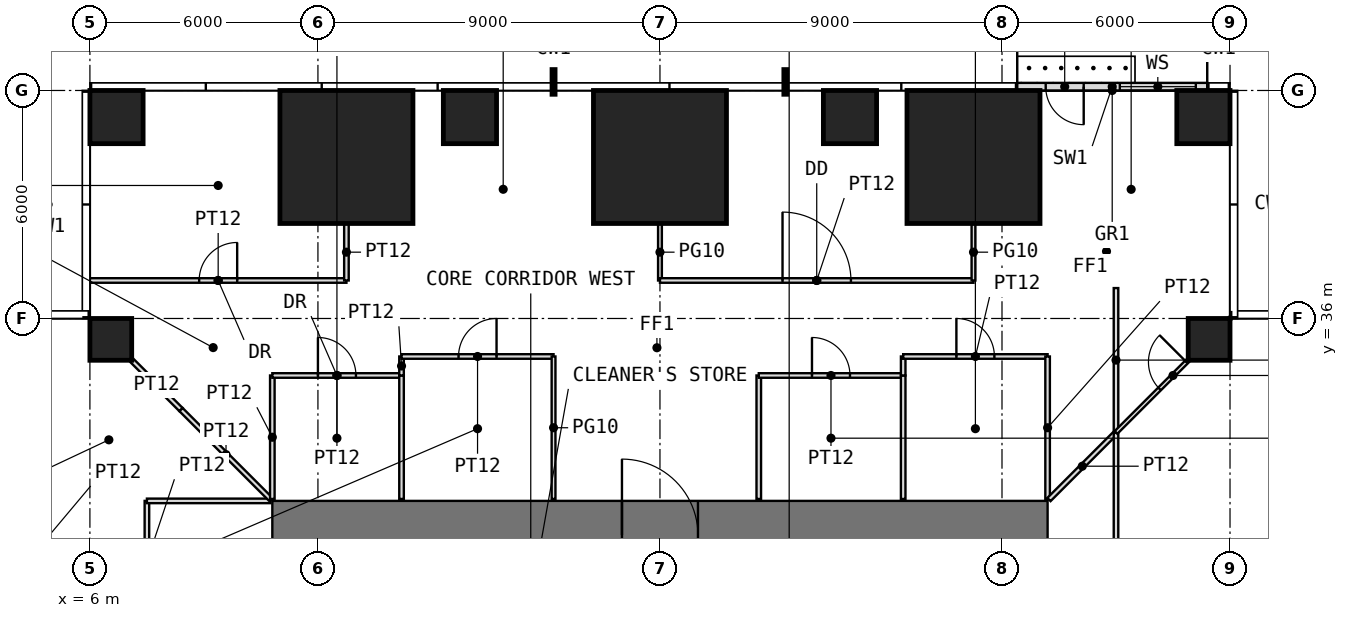
"""IFC4 building model, lengths in metres.
Left out: names, types, materials, properties, quantities, classifications, styles, units other than length and angle.
Written with IfcOpenShell. Run it as: python <this file> out.ifc"""

import sys

from ifc_helpers import new_model, si_unit, direction, frame, frame_2d, origin, origin_2d, place, context, subcontext, project, spatial, rectangle, extrude, element, fill, save


model = new_model("IFC4")
c1 = context("Model", 3, precision=1e-05, world=origin(), true_north=direction((0.0, 1.0)))
c2 = subcontext(c1, "Body", "Model", "MODEL_VIEW")
j1 = project(units=[si_unit("LENGTHUNIT", "METRE"), si_unit("PLANEANGLEUNIT", "RADIAN")], contexts=[c1])
p1 = place(None, origin())
s1 = spatial("IfcSite", under=j1, at=p1, CompositionType="ELEMENT")
p2 = place(p1, origin())
s2 = spatial("IfcBuilding", under=s1, at=p2, CompositionType="ELEMENT")
p3 = place(p2, frame((0.0, 0.0, 38.5)))
s3 = spatial("IfcBuildingStorey", under=s2, at=p3, CompositionType="ELEMENT", Elevation=38.5)
for number, where, z_axis, x_axis in (
    (1, (6.55, 35.45, 0.0), (0.0, 0.0, 1.0), (1.0, 0.0, 0.0)),
    (2, (35.45, 35.45, 0.0), (0.0, 0.0, 1.0), (1.0, 0.0, 0.0)),
):
    element("IfcColumn", number, at=place(p3, frame(where, z_axis=z_axis, x_axis=x_axis)), inside=s3, PredefinedType="COLUMN", context=c2, shape_type="SweptSolid", body=[
        extrude(rectangle(XDim=1.1, YDim=1.1, at=origin_2d()), origin(), (0.0, 0.0, 1.0), 4.0),
    ])
p4 = place(p3, frame((6.7, 41.3, 0.0), z_axis=(0.0, 0.0, 1.0), x_axis=(1.0, 0.0, 0.0)))
e3 = element("IfcColumn", 3, at=p4, inside=s3, PredefinedType="COLUMN", context=c2, shape_type="SweptSolid", body=[
    extrude(rectangle(XDim=1.4, YDim=1.4, at=origin_2d()), origin(), (0.0, 0.0, 1.0), 4.0),
])
p5 = place(p3, frame((12.75, 40.25, 0.0), z_axis=(0.0, 0.0, 1.0), x_axis=(1.0, 0.0, 0.0)))
e4 = element("IfcColumn", 4, at=p5, inside=s3, PredefinedType="COLUMN", context=c2, shape_type="SweptSolid", body=[
    extrude(rectangle(XDim=3.5, YDim=3.5, at=origin_2d()), origin(), (0.0, 0.0, 1.0), 4.0),
])
p6 = place(p3, frame((16.0, 41.3, 0.0), z_axis=(0.0, 0.0, 1.0), x_axis=(1.0, 0.0, 0.0)))
e5 = element("IfcColumn", 5, at=p6, inside=s3, PredefinedType="COLUMN", context=c2, shape_type="SweptSolid", body=[
    extrude(rectangle(XDim=1.4, YDim=1.4, at=origin_2d()), origin(), (0.0, 0.0, 1.0), 4.0),
])
p7 = place(p3, frame((21.0, 40.25, 0.0), z_axis=(0.0, 0.0, 1.0), x_axis=(1.0, 0.0, 0.0)))
e6 = element("IfcColumn", 6, at=p7, inside=s3, PredefinedType="COLUMN", context=c2, shape_type="SweptSolid", body=[
    extrude(rectangle(XDim=3.5, YDim=3.5, at=origin_2d()), origin(), (0.0, 0.0, 1.0), 4.0),
])
p8 = place(p3, frame((26.0, 41.3, 0.0), z_axis=(0.0, 0.0, 1.0), x_axis=(1.0, 0.0, 0.0)))
e7 = element("IfcColumn", 7, at=p8, inside=s3, PredefinedType="COLUMN", context=c2, shape_type="SweptSolid", body=[
    extrude(rectangle(XDim=1.4, YDim=1.4, at=origin_2d()), origin(), (0.0, 0.0, 1.0), 4.0),
])
p9 = place(p3, frame((29.25, 40.25, 0.0), z_axis=(0.0, 0.0, 1.0), x_axis=(1.0, 0.0, 0.0)))
e8 = element("IfcColumn", 8, at=p9, inside=s3, PredefinedType="COLUMN", context=c2, shape_type="SweptSolid", body=[
    extrude(rectangle(XDim=3.5, YDim=3.5, at=origin_2d()), origin(), (0.0, 0.0, 1.0), 4.0),
])
p10 = place(p3, frame((35.3, 41.3, 0.0), z_axis=(0.0, 0.0, 1.0), x_axis=(1.0, 0.0, 0.0)))
e9 = element("IfcColumn", 9, at=p10, inside=s3, PredefinedType="COLUMN", context=c2, shape_type="SweptSolid", body=[
    extrude(rectangle(XDim=1.4, YDim=1.4, at=origin_2d()), origin(), (0.0, 0.0, 1.0), 4.0),
])
p11 = place(p3, frame((35.4, 42.1, 0.0), z_axis=(0.0, 0.0, 1.0), x_axis=(-1.0, 0.0, 0.0)))
e10 = element("IfcWall", 10, at=p11, inside=s3, PredefinedType="USERDEFINED", context=c2, shape_type="SweptSolid", body=[
    extrude(rectangle(XDim=5.0, YDim=0.2, at=frame_2d((2.5, 0.0))), origin(), (0.0, 0.0, 1.0), 3.75),
])
p12 = place(p11, frame((3.25, 0.0, 0.0)))
e11 = element("IfcOpeningElement", 11, at=p12, cuts=e10, PredefinedType="OPENING", context=c2, shape_type="SweptSolid", body=[
    extrude(rectangle(XDim=1.0, YDim=2.4, at=frame_2d((0.5, 1.2))), frame((0.0, 0.11, 0.0), z_axis=(0.0, -1.0, 0.0), x_axis=(1.0, 0.0, 0.0)), (0.0, 0.0, 1.0), 0.22),
])
p13 = place(p11, frame((0.3, 0.0, 0.3)))
e12 = element("IfcOpeningElement", 12, at=p13, cuts=e10, PredefinedType="OPENING", context=c2, shape_type="SweptSolid", body=[
    extrude(rectangle(XDim=2.0, YDim=2.7, at=frame_2d((1.0, 1.35))), frame((0.0, 0.11, 0.0), z_axis=(0.0, -1.0, 0.0), x_axis=(1.0, 0.0, 0.0)), (0.0, 0.0, 1.0), 0.22),
])
p14 = place(p3, frame((10.8, 30.3, -0.05), z_axis=(0.0, 0.0, 1.0), x_axis=(1.0, 0.0, 0.0)))
e13 = element("IfcWall", 13, at=p14, inside=s3, PredefinedType="SHEAR", context=c2, shape_type="SweptSolid", body=[
    extrude(rectangle(XDim=20.4, YDim=1.8, at=frame_2d((10.2, 0.0))), origin(), (0.0, 0.0, 1.0), 4.0),
])
p15 = place(p14, frame((9.2, 0.0, 0.05)))
e14 = element("IfcOpeningElement", 14, at=p15, cuts=e13, PredefinedType="OPENING", context=c2, shape_type="SweptSolid", body=[
    extrude(rectangle(XDim=2.0, YDim=2.2, at=frame_2d((1.0, 1.1))), frame((0.0, 0.91, 0.0), z_axis=(0.0, -1.0, 0.0), x_axis=(1.0, 0.0, 0.0)), (0.0, 0.0, 1.0), 1.82),
])
p16 = place(p3, frame((6.0, 37.0, 0.0), z_axis=(0.0, 0.0, 1.0), x_axis=(1.0, 0.0, 0.0)))
e15 = element("IfcWall", 15, at=p16, inside=s3, PredefinedType="PARTITIONING", context=c2, shape_type="SweptSolid", body=[
    extrude(rectangle(XDim=6.75, YDim=0.12, at=frame_2d((3.375, 0.0))), origin(), (0.0, 0.0, 1.0), 3.75),
])
p17 = place(p16, frame((2.875, 0.0, 0.0)))
e16 = element("IfcOpeningElement", 16, at=p17, cuts=e15, PredefinedType="OPENING", context=c2, shape_type="SweptSolid", body=[
    extrude(rectangle(XDim=1.0, YDim=2.2, at=frame_2d((0.5, 1.1))), frame((0.0, 0.07, 0.0), z_axis=(0.0, -1.0, 0.0), x_axis=(1.0, 0.0, 0.0)), (0.0, 0.0, 1.0), 0.14),
])
p18 = place(p3, frame((7.11, 34.89, 0.0), z_axis=(0.0, 0.0, 1.0), x_axis=(0.707106781187, -0.707106781187, 0.0)))
e17 = element("IfcWall", 17, at=p18, inside=s3, PredefinedType="PARTITIONING", context=c2, shape_type="SweptSolid", body=[
    extrude(rectangle(XDim=1.822, YDim=0.12, at=frame_2d((0.911, 0.0))), origin(), (0.0, 0.0, 1.0), 3.75),
])
p19 = place(p3, frame((7.5, 28.0, 0.0), z_axis=(0.0, 0.0, 1.0), x_axis=(0.0, 1.0, 0.0)))
e18 = element("IfcWall", 18, at=p19, inside=s3, PredefinedType="PARTITIONING", context=c2, shape_type="SweptSolid", body=[
    extrude(rectangle(XDim=3.2, YDim=0.12, at=frame_2d((1.6, 0.0))), origin(), (0.0, 0.0, 1.0), 3.75),
])
p20 = place(p19, frame((1.1, 0.0, 0.0)))
e19 = element("IfcOpeningElement", 19, at=p20, cuts=e18, PredefinedType="OPENING", context=c2, shape_type="SweptSolid", body=[
    extrude(rectangle(XDim=1.0, YDim=2.2, at=frame_2d((0.5, 1.1))), frame((0.0, 0.07, 0.0), z_axis=(0.0, -1.0, 0.0), x_axis=(1.0, 0.0, 0.0)), (0.0, 0.0, 1.0), 0.14),
])
p21 = place(p3, frame((7.5, 31.2, 0.0), z_axis=(0.0, 0.0, 1.0), x_axis=(1.0, 0.0, 0.0)))
e20 = element("IfcWall", 20, at=p21, inside=s3, PredefinedType="PARTITIONING", context=c2, shape_type="SweptSolid", body=[
    extrude(rectangle(XDim=3.25, YDim=0.12, at=frame_2d((1.625, 0.0))), origin(), (0.0, 0.0, 1.0), 3.75),
])
p22 = place(p3, frame((8.398, 33.602, 0.0), z_axis=(0.0, 0.0, 1.0), x_axis=(0.707106781187, -0.707106781187, 0.0)))
e21 = element("IfcWall", 21, at=p22, inside=s3, PredefinedType="PARTITIONING", context=c2, shape_type="SweptSolid", body=[
    extrude(rectangle(XDim=3.346, YDim=0.12, at=frame_2d((1.673, 0.0))), origin(), (0.0, 0.0, 1.0), 3.75),
])
p23 = place(p3, frame((10.8, 31.25, 0.0), z_axis=(0.0, 0.0, 1.0), x_axis=(0.0, 1.0, 0.0)))
e22 = element("IfcWall", 22, at=p23, inside=s3, PredefinedType="PARTITIONING", context=c2, shape_type="SweptSolid", body=[
    extrude(rectangle(XDim=3.25, YDim=0.12, at=frame_2d((1.625, 0.0))), origin(), (0.0, 0.0, 1.0), 3.75),
])
p24 = place(p3, frame((10.8, 34.5, 0.0), z_axis=(0.0, 0.0, 1.0), x_axis=(1.0, 0.0, 0.0)))
e23 = element("IfcWall", 23, at=p24, inside=s3, PredefinedType="PARTITIONING", context=c2, shape_type="SweptSolid", body=[
    extrude(rectangle(XDim=3.4, YDim=0.12, at=frame_2d((1.7, 0.0))), origin(), (0.0, 0.0, 1.0), 3.75),
])
p25 = place(p24, frame((1.2, 0.0, 0.0)))
e24 = element("IfcOpeningElement", 24, at=p25, cuts=e23, PredefinedType="OPENING", context=c2, shape_type="SweptSolid", body=[
    extrude(rectangle(XDim=1.0, YDim=2.2, at=frame_2d((0.5, 1.1))), frame((0.0, 0.07, 0.0), z_axis=(0.0, -1.0, 0.0), x_axis=(1.0, 0.0, 0.0)), (0.0, 0.0, 1.0), 0.14),
])
p26 = place(p3, frame((12.75, 37.0, 0.0), z_axis=(0.0, 0.0, 1.0), x_axis=(0.0, 1.0, 0.0)))
e25 = element("IfcWall", 25, at=p26, inside=s3, PredefinedType="PARTITIONING", context=c2, shape_type="SweptSolid", body=[
    extrude(rectangle(XDim=1.49, YDim=0.12, at=frame_2d((0.745, 0.0))), origin(), (0.0, 0.0, 1.0), 3.75),
])
p27 = place(p3, frame((14.2, 31.25, 0.0), z_axis=(0.0, 0.0, 1.0), x_axis=(0.0, 1.0, 0.0)))
e26 = element("IfcWall", 26, at=p27, inside=s3, PredefinedType="PARTITIONING", context=c2, shape_type="SweptSolid", body=[
    extrude(rectangle(XDim=3.25, YDim=0.12, at=frame_2d((1.625, 0.0))), origin(), (0.0, 0.0, 1.0), 3.75),
])
p28 = place(p3, frame((14.2, 34.5, 0.0), z_axis=(0.0, 0.0, 1.0), x_axis=(0.0, 1.0, 0.0)))
e27 = element("IfcWall", 27, at=p28, inside=s3, PredefinedType="PARTITIONING", context=c2, shape_type="SweptSolid", body=[
    extrude(rectangle(XDim=0.5, YDim=0.12, at=frame_2d((0.25, 0.0))), origin(), (0.0, 0.0, 1.0), 3.75),
])
p29 = place(p3, frame((14.2, 35.0, 0.0), z_axis=(0.0, 0.0, 1.0), x_axis=(1.0, 0.0, 0.0)))
e28 = element("IfcWall", 28, at=p29, inside=s3, PredefinedType="PARTITIONING", context=c2, shape_type="SweptSolid", body=[
    extrude(rectangle(XDim=4.0, YDim=0.12, at=frame_2d((2.0, 0.0))), origin(), (0.0, 0.0, 1.0), 3.75),
])
p30 = place(p29, frame((1.5, 0.0, 0.0)))
e29 = element("IfcOpeningElement", 29, at=p30, cuts=e28, PredefinedType="OPENING", context=c2, shape_type="SweptSolid", body=[
    extrude(rectangle(XDim=1.0, YDim=2.4, at=frame_2d((0.5, 1.2))), frame((0.0, 0.07, 0.0), z_axis=(0.0, -1.0, 0.0), x_axis=(1.0, 0.0, 0.0)), (0.0, 0.0, 1.0), 0.14),
])
p31 = place(p3, frame((18.2, 31.25, 0.0), z_axis=(0.0, 0.0, 1.0), x_axis=(0.0, 1.0, 0.0)))
e30 = element("IfcWall", 30, at=p31, inside=s3, PredefinedType="PARTITIONING", context=c2, shape_type="SweptSolid", body=[
    extrude(rectangle(XDim=3.75, YDim=0.1, at=frame_2d((1.875, 0.0))), origin(), (0.0, 0.0, 1.0), 3.75),
])
p32 = place(p3, frame((21.0, 37.0, 0.0), z_axis=(0.0, 0.0, 1.0), x_axis=(0.0, 1.0, 0.0)))
e31 = element("IfcWall", 31, at=p32, inside=s3, PredefinedType="PARTITIONING", context=c2, shape_type="SweptSolid", body=[
    extrude(rectangle(XDim=1.49, YDim=0.1, at=frame_2d((0.745, 0.0))), origin(), (0.0, 0.0, 1.0), 3.75),
])
p33 = place(p3, frame((21.0, 37.0, 0.0), z_axis=(0.0, 0.0, 1.0), x_axis=(1.0, 0.0, 0.0)))
e32 = element("IfcWall", 32, at=p33, inside=s3, PredefinedType="PARTITIONING", context=c2, shape_type="SweptSolid", body=[
    extrude(rectangle(XDim=8.25, YDim=0.12, at=frame_2d((4.125, 0.0))), origin(), (0.0, 0.0, 1.0), 3.75),
])
p34 = place(p33, frame((3.225, 0.0, 0.0)))
e33 = element("IfcOpeningElement", 33, at=p34, cuts=e32, PredefinedType="OPENING", context=c2, shape_type="SweptSolid", body=[
    extrude(rectangle(XDim=1.8, YDim=2.4, at=frame_2d((0.9, 1.2))), frame((0.0, 0.07, 0.0), z_axis=(0.0, -1.0, 0.0), x_axis=(1.0, 0.0, 0.0)), (0.0, 0.0, 1.0), 0.14),
])
p35 = place(p3, frame((23.6, 31.25, 0.0), z_axis=(0.0, 0.0, 1.0), x_axis=(0.0, 1.0, 0.0)))
e34 = element("IfcWall", 34, at=p35, inside=s3, PredefinedType="PARTITIONING", context=c2, shape_type="SweptSolid", body=[
    extrude(rectangle(XDim=3.25, YDim=0.12, at=frame_2d((1.625, 0.0))), origin(), (0.0, 0.0, 1.0), 3.75),
])
p36 = place(p3, frame((23.6, 34.5, 0.0), z_axis=(0.0, 0.0, 1.0), x_axis=(1.0, 0.0, 0.0)))
e35 = element("IfcWall", 35, at=p36, inside=s3, PredefinedType="PARTITIONING", context=c2, shape_type="SweptSolid", body=[
    extrude(rectangle(XDim=3.8, YDim=0.12, at=frame_2d((1.9, 0.0))), origin(), (0.0, 0.0, 1.0), 3.75),
])
p37 = place(p36, frame((1.4, 0.0, 0.0)))
e36 = element("IfcOpeningElement", 36, at=p37, cuts=e35, PredefinedType="OPENING", context=c2, shape_type="SweptSolid", body=[
    extrude(rectangle(XDim=1.0, YDim=2.2, at=frame_2d((0.5, 1.1))), frame((0.0, 0.07, 0.0), z_axis=(0.0, -1.0, 0.0), x_axis=(1.0, 0.0, 0.0)), (0.0, 0.0, 1.0), 0.14),
])
p38 = place(p3, frame((27.4, 31.25, 0.0), z_axis=(0.0, 0.0, 1.0), x_axis=(0.0, 1.0, 0.0)))
e37 = element("IfcWall", 37, at=p38, inside=s3, PredefinedType="PARTITIONING", context=c2, shape_type="SweptSolid", body=[
    extrude(rectangle(XDim=3.25, YDim=0.12, at=frame_2d((1.625, 0.0))), origin(), (0.0, 0.0, 1.0), 3.75),
])
p39 = place(p3, frame((27.4, 34.5, 0.0), z_axis=(0.0, 0.0, 1.0), x_axis=(0.0, 1.0, 0.0)))
e38 = element("IfcWall", 38, at=p39, inside=s3, PredefinedType="PARTITIONING", context=c2, shape_type="SweptSolid", body=[
    extrude(rectangle(XDim=0.5, YDim=0.12, at=frame_2d((0.25, 0.0))), origin(), (0.0, 0.0, 1.0), 3.75),
])
p40 = place(p3, frame((27.4, 35.0, 0.0), z_axis=(0.0, 0.0, 1.0), x_axis=(1.0, 0.0, 0.0)))
e39 = element("IfcWall", 39, at=p40, inside=s3, PredefinedType="PARTITIONING", context=c2, shape_type="SweptSolid", body=[
    extrude(rectangle(XDim=3.8, YDim=0.12, at=frame_2d((1.9, 0.0))), origin(), (0.0, 0.0, 1.0), 3.75),
])
p41 = place(p40, frame((1.4, 0.0, 0.0)))
e40 = element("IfcOpeningElement", 40, at=p41, cuts=e39, PredefinedType="OPENING", context=c2, shape_type="SweptSolid", body=[
    extrude(rectangle(XDim=1.0, YDim=2.4, at=frame_2d((0.5, 1.2))), frame((0.0, 0.07, 0.0), z_axis=(0.0, -1.0, 0.0), x_axis=(1.0, 0.0, 0.0)), (0.0, 0.0, 1.0), 0.14),
])
p42 = place(p3, frame((29.25, 37.0, 0.0), z_axis=(0.0, 0.0, 1.0), x_axis=(0.0, 1.0, 0.0)))
e41 = element("IfcWall", 41, at=p42, inside=s3, PredefinedType="PARTITIONING", context=c2, shape_type="SweptSolid", body=[
    extrude(rectangle(XDim=1.49, YDim=0.1, at=frame_2d((0.745, 0.0))), origin(), (0.0, 0.0, 1.0), 3.75),
])
p43 = place(p3, frame((31.2, 31.25, 0.0), z_axis=(0.0, 0.0, 1.0), x_axis=(0.0, 1.0, 0.0)))
e42 = element("IfcWall", 42, at=p43, inside=s3, PredefinedType="PARTITIONING", context=c2, shape_type="SweptSolid", body=[
    extrude(rectangle(XDim=3.75, YDim=0.12, at=frame_2d((1.875, 0.0))), origin(), (0.0, 0.0, 1.0), 3.75),
])
p44 = place(p3, frame((31.235, 31.235, 0.0), z_axis=(0.0, 0.0, 1.0), x_axis=(0.707106781187, 0.707106781187, 0.0)))
e43 = element("IfcWall", 43, at=p44, inside=s3, PredefinedType="PARTITIONING", context=c2, shape_type="SweptSolid", body=[
    extrude(rectangle(XDim=2.481, YDim=0.12, at=frame_2d((1.241, 0.0))), origin(), (0.0, 0.0, 1.0), 3.75),
])
p45 = place(p3, frame((33.0, 9.01, 0.0), z_axis=(0.0, 0.0, 1.0), x_axis=(0.0, 1.0, 0.0)))
e44 = element("IfcWall", 44, at=p45, inside=s3, PredefinedType="PARTITIONING", context=c2, shape_type="SweptSolid", body=[
    extrude(rectangle(XDim=23.98, YDim=0.12, at=frame_2d((11.99, 0.0))), origin(), (0.0, 0.0, 1.0), 3.75),
])
p46 = place(p45, frame((11.49, 0.0, 0.0)))
e45 = element("IfcOpeningElement", 45, at=p46, cuts=e44, PredefinedType="OPENING", context=c2, shape_type="SweptSolid", body=[
    extrude(rectangle(XDim=1.0, YDim=2.4, at=frame_2d((0.5, 1.2))), frame((0.0, 0.07, 0.0), z_axis=(0.0, -1.0, 0.0), x_axis=(1.0, 0.0, 0.0)), (0.0, 0.0, 1.0), 0.14),
])
p47 = place(p3, frame((33.0, 33.01, 0.0), z_axis=(0.0, 0.0, 1.0), x_axis=(0.0, 1.0, 0.0)))
e46 = element("IfcWall", 46, at=p47, inside=s3, PredefinedType="PARTITIONING", context=c2, shape_type="SweptSolid", body=[
    extrude(rectangle(XDim=3.79, YDim=0.12, at=frame_2d((1.895, 0.0))), origin(), (0.0, 0.0, 1.0), 3.75),
])
p48 = place(p3, frame((33.0, 33.0, 0.0), z_axis=(0.0, 0.0, 1.0), x_axis=(0.707106781187, 0.707106781187, 0.0)))
e47 = element("IfcWall", 47, at=p48, inside=s3, PredefinedType="PARTITIONING", context=c2, shape_type="SweptSolid", body=[
    extrude(rectangle(XDim=4.243, YDim=0.1, at=frame_2d((2.121, 0.0))), origin(), (0.0, 0.0, 1.0), 3.75),
])
p49 = place(p48, frame((1.621, 0.0, 0.0)))
e48 = element("IfcOpeningElement", 48, at=p49, cuts=e47, PredefinedType="OPENING", context=c2, shape_type="SweptSolid", body=[
    extrude(rectangle(XDim=1.0, YDim=2.4, at=frame_2d((0.5, 1.2))), frame((0.0, 0.06, 0.0), z_axis=(0.0, -1.0, 0.0), x_axis=(1.0, 0.0, 0.0)), (0.0, 0.0, 1.0), 0.12),
])
p50 = place(p12, origin())
e49 = element("IfcDoor", 49, at=p50, inside=s3, OperationType="SINGLE_SWING_LEFT", PredefinedType="DOOR", context=c2, shape_type="SweptSolid", body=[
    extrude(rectangle(XDim=1.0, YDim=2.4, at=frame_2d((0.5, 1.2))), frame((0.0, 0.025, 0.0), z_axis=(0.0, -1.0, 0.0), x_axis=(1.0, 0.0, 0.0)), (0.0, 0.0, 1.0), 0.05),
])
fill(e11, e49)
p51 = place(p13, origin())
e50 = element("IfcWindow", 50, at=p51, inside=s3, PartitioningType="SINGLE_PANEL", PredefinedType="WINDOW", context=c2, shape_type="SweptSolid", body=[
    extrude(rectangle(XDim=2.0, YDim=2.7, at=frame_2d((1.0, 1.35))), frame((0.0, 0.03, 0.0), z_axis=(0.0, -1.0, 0.0), x_axis=(1.0, 0.0, 0.0)), (0.0, 0.0, 1.0), 0.06),
])
fill(e12, e50)
p52 = place(p15, origin())
e51 = element("IfcDoor", 51, at=p52, inside=s3, OperationType="DOUBLE_DOOR_SINGLE_SWING", PredefinedType="DOOR", context=c2, shape_type="SweptSolid", body=[
    extrude(rectangle(XDim=2.0, YDim=2.2, at=frame_2d((1.0, 1.1))), frame((0.0, 0.025, 0.0), z_axis=(0.0, -1.0, 0.0), x_axis=(1.0, 0.0, 0.0)), (0.0, 0.0, 1.0), 0.05),
])
fill(e14, e51)
p53 = place(p25, origin())
e52 = element("IfcDoor", 52, at=p53, inside=s3, OperationType="SINGLE_SWING_LEFT", PredefinedType="DOOR", context=c2, shape_type="SweptSolid", body=[
    extrude(rectangle(XDim=1.0, YDim=2.2, at=frame_2d((0.5, 1.1))), frame((0.0, 0.025, 0.0), z_axis=(0.0, -1.0, 0.0), x_axis=(1.0, 0.0, 0.0)), (0.0, 0.0, 1.0), 0.05),
])
fill(e24, e52)
p54 = place(p30, origin())
e53 = element("IfcDoor", 53, at=p54, inside=s3, OperationType="SINGLE_SWING_RIGHT", PredefinedType="DOOR", context=c2, shape_type="SweptSolid", body=[
    extrude(rectangle(XDim=1.0, YDim=2.4, at=frame_2d((0.5, 1.2))), frame((0.0, 0.025, 0.0), z_axis=(0.0, -1.0, 0.0), x_axis=(1.0, 0.0, 0.0)), (0.0, 0.0, 1.0), 0.05),
])
fill(e29, e53)
p55 = place(p37, origin())
e54 = element("IfcDoor", 54, at=p55, inside=s3, OperationType="SINGLE_SWING_LEFT", PredefinedType="DOOR", context=c2, shape_type="SweptSolid", body=[
    extrude(rectangle(XDim=1.0, YDim=2.2, at=frame_2d((0.5, 1.1))), frame((0.0, 0.025, 0.0), z_axis=(0.0, -1.0, 0.0), x_axis=(1.0, 0.0, 0.0)), (0.0, 0.0, 1.0), 0.05),
])
fill(e36, e54)
p56 = place(p41, origin())
e55 = element("IfcDoor", 55, at=p56, inside=s3, OperationType="SINGLE_SWING_LEFT", PredefinedType="DOOR", context=c2, shape_type="SweptSolid", body=[
    extrude(rectangle(XDim=1.0, YDim=2.4, at=frame_2d((0.5, 1.2))), frame((0.0, 0.025, 0.0), z_axis=(0.0, -1.0, 0.0), x_axis=(1.0, 0.0, 0.0)), (0.0, 0.0, 1.0), 0.05),
])
fill(e40, e55)
p57 = place(p17, origin())
e56 = element("IfcDoor", 56, at=p57, inside=s3, OperationType="SINGLE_SWING_RIGHT", PredefinedType="DOOR", context=c2, shape_type="SweptSolid", body=[
    extrude(rectangle(XDim=1.0, YDim=2.2, at=frame_2d((0.5, 1.1))), frame((0.0, 0.025, 0.0), z_axis=(0.0, -1.0, 0.0), x_axis=(1.0, 0.0, 0.0)), (0.0, 0.0, 1.0), 0.05),
])
fill(e16, e56)
p58 = place(p34, origin())
e57 = element("IfcDoor", 57, at=p58, inside=s3, OperationType="DOUBLE_DOOR_SINGLE_SWING", PredefinedType="DOOR", context=c2, shape_type="SweptSolid", body=[
    extrude(rectangle(XDim=1.8, YDim=2.4, at=frame_2d((0.9, 1.2))), frame((0.0, 0.025, 0.0), z_axis=(0.0, -1.0, 0.0), x_axis=(1.0, 0.0, 0.0)), (0.0, 0.0, 1.0), 0.05),
])
fill(e33, e57)
p59 = place(p49, origin())
e58 = element("IfcDoor", 58, at=p59, inside=s3, OperationType="SINGLE_SWING_RIGHT", PredefinedType="DOOR", context=c2, shape_type="SweptSolid", body=[
    extrude(rectangle(XDim=1.0, YDim=2.4, at=frame_2d((0.5, 1.2))), frame((0.0, 0.025, 0.0), z_axis=(0.0, -1.0, 0.0), x_axis=(1.0, 0.0, 0.0)), (0.0, 0.0, 1.0), 0.05),
])
fill(e48, e58)
save(model, sys.argv[1])
